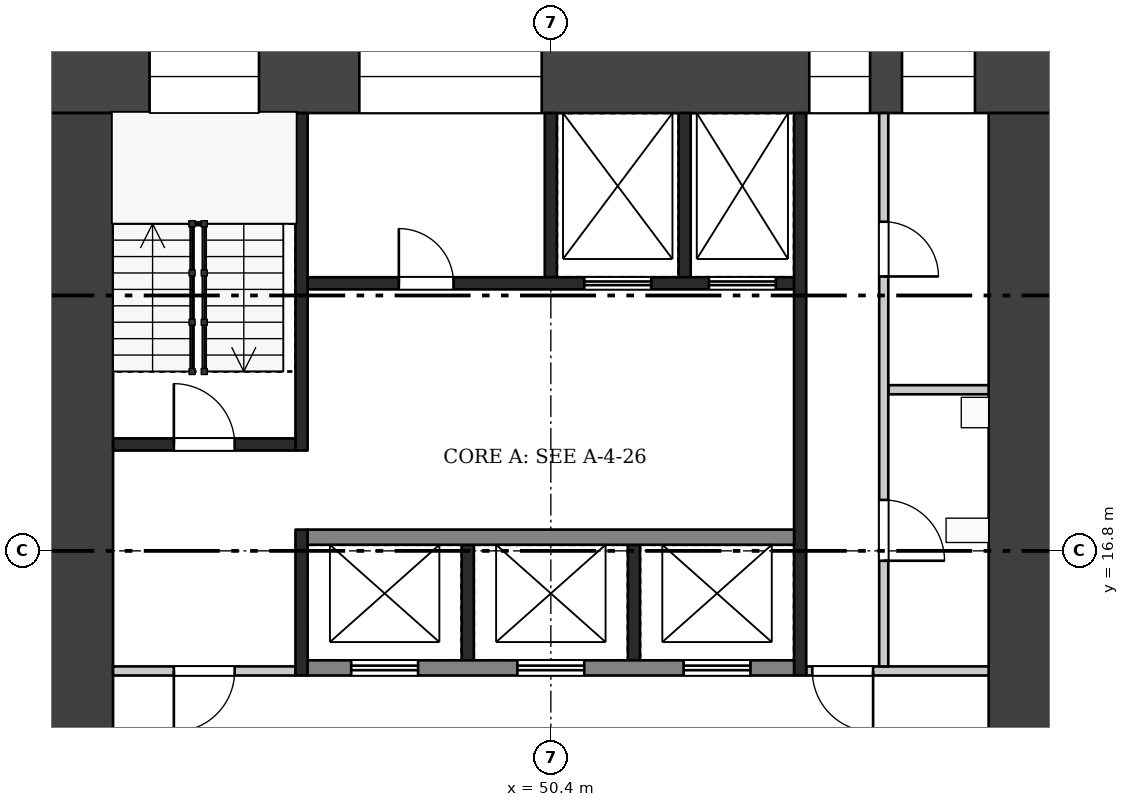
"""IFC4 building model, lengths in metres.
Left out: names, types, materials, properties, quantities, classifications, styles, units other than length and angle.
Written with IfcOpenShell. Run it as: python <this file> out.ifc"""

import sys

from ifc_helpers import new_model, si_unit, direction, frame, frame_2d, origin, place, context, subcontext, project, spatial, rectangle, extrude, element, fill, save


model = new_model("IFC4")
c1 = context("Model", 3, precision=1e-05, world=origin(), true_north=direction((0.0, 1.0)))
c2 = subcontext(c1, "Body", "Model", "MODEL_VIEW")
j1 = project(units=[si_unit("LENGTHUNIT", "METRE"), si_unit("PLANEANGLEUNIT", "RADIAN")], contexts=[c1])
p1 = place(None, origin())
s1 = spatial("IfcSite", under=j1, at=p1, CompositionType="ELEMENT")
p2 = place(p1, origin())
s2 = spatial("IfcBuilding", under=s1, at=p2, CompositionType="ELEMENT")
p3 = place(p2, frame((0.0, 0.0, 179.2)))
s3 = spatial("IfcBuildingStorey", under=s2, at=p3, CompositionType="ELEMENT", Elevation=179.2)
p4 = place(p3, frame((42.0, 24.6, 0.0), z_axis=(0.0, 0.0, 1.0), x_axis=(1.0, 0.0, 0.0)))
e1 = element("IfcWall", 1, at=p4, inside=s3, PredefinedType="SHEAR", context=c2, shape_type="SweptSolid", body=[
    extrude(rectangle(XDim=16.8, YDim=1.2, at=frame_2d((8.4, 0.0))), origin(), (0.0, 0.0, 1.0), 3.22),
])
p5 = place(p4, frame((1.8, 0.0, 0.5)))
e2 = element("IfcOpeningElement", 2, at=p5, cuts=e1, PredefinedType="OPENING", context=c2, shape_type="SweptSolid", body=[
    extrude(rectangle(XDim=1.8, YDim=2.4, at=frame_2d((0.9, 1.2))), frame((0.0, 0.61, 0.0), z_axis=(0.0, -1.0, 0.0), x_axis=(1.0, 0.0, 0.0)), (0.0, 0.0, 1.0), 1.22),
])
p6 = place(p4, frame((5.25, 0.0, 1.6)))
e3 = element("IfcOpeningElement", 3, at=p6, cuts=e1, PredefinedType="OPENING", context=c2, shape_type="SweptSolid", body=[
    extrude(rectangle(XDim=3.0, YDim=1.2, at=frame_2d((1.5, 0.6))), frame((0.0, 0.61, 0.0), z_axis=(0.0, -1.0, 0.0), x_axis=(1.0, 0.0, 0.0)), (0.0, 0.0, 1.0), 1.22),
])
p7 = place(p4, frame((12.65, 0.0, 0.6)))
e4 = element("IfcOpeningElement", 4, at=p7, cuts=e1, PredefinedType="OPENING", context=c2, shape_type="SweptSolid", body=[
    extrude(rectangle(XDim=1.0, YDim=2.1, at=frame_2d((0.5, 1.05))), frame((0.0, 0.61, 0.0), z_axis=(0.0, -1.0, 0.0), x_axis=(1.0, 0.0, 0.0)), (0.0, 0.0, 1.0), 1.22),
])
p8 = place(p4, frame((14.175, 0.0, 1.6)))
e5 = element("IfcOpeningElement", 5, at=p8, cuts=e1, PredefinedType="OPENING", context=c2, shape_type="SweptSolid", body=[
    extrude(rectangle(XDim=1.2, YDim=1.2, at=frame_2d((0.6, 0.6))), frame((0.0, 0.61, 0.0), z_axis=(0.0, -1.0, 0.0), x_axis=(1.0, 0.0, 0.0)), (0.0, 0.0, 1.0), 1.22),
])
p9 = place(p3, frame((42.6, 9.6, 0.0), z_axis=(0.0, 0.0, 1.0), x_axis=(0.0, 1.0, 0.0)))
e6 = element("IfcWall", 6, at=p9, inside=s3, PredefinedType="SHEAR", context=c2, shape_type="SweptSolid", body=[
    extrude(rectangle(XDim=14.4, YDim=1.2, at=frame_2d((7.2, 0.0))), origin(), (0.0, 0.0, 1.0), 3.22),
])
p10 = place(p9, frame((2.1, 0.0, 0.0)))
e7 = element("IfcOpeningElement", 7, at=p10, cuts=e6, PredefinedType="OPENING", context=c2, shape_type="SweptSolid", body=[
    extrude(rectangle(XDim=1.8, YDim=2.1, at=frame_2d((0.9, 1.05))), frame((0.0, 0.61, 0.0), z_axis=(0.0, -1.0, 0.0), x_axis=(1.0, 0.0, 0.0)), (0.0, 0.0, 1.0), 1.22),
])
p11 = place(p3, frame((58.2, 9.6, 0.0), z_axis=(0.0, 0.0, 1.0), x_axis=(0.0, 1.0, 0.0)))
e8 = element("IfcWall", 8, at=p11, inside=s3, PredefinedType="SHEAR", context=c2, shape_type="SweptSolid", body=[
    extrude(rectangle(XDim=14.4, YDim=1.2, at=frame_2d((7.2, 0.0))), origin(), (0.0, 0.0, 1.0), 3.22),
])
p12 = place(p11, frame((2.1, 0.0, 0.0)))
e9 = element("IfcOpeningElement", 9, at=p12, cuts=e8, PredefinedType="OPENING", context=c2, shape_type="SweptSolid", body=[
    extrude(rectangle(XDim=1.8, YDim=2.1, at=frame_2d((0.9, 1.05))), frame((0.0, 0.61, 0.0), z_axis=(0.0, -1.0, 0.0), x_axis=(1.0, 0.0, 0.0)), (0.0, 0.0, 1.0), 1.22),
])
for number, where, z_axis, x_axis in (
    (10, (49.033, 15.0, 0.0), (0.0, 0.0, 1.0), (0.0, 1.0, 0.0)),
    (11, (51.767, 15.0, 0.0), (0.0, 0.0, 1.0), (0.0, 1.0, 0.0)),
):
    element("IfcWall", number, at=place(p3, frame(where, z_axis=z_axis, x_axis=x_axis)), inside=s3, PredefinedType="SHEAR", context=c2, shape_type="SweptSolid", body=[
        extrude(rectangle(XDim=1.9, YDim=0.2, at=frame_2d((0.95, 0.0))), origin(), (0.0, 0.0, 1.0), 3.22),
    ])
p13 = place(p3, frame((46.4, 14.875, 0.0), z_axis=(0.0, 0.0, 1.0), x_axis=(1.0, 0.0, 0.0)))
e12 = element("IfcWall", 12, at=p13, inside=s3, PredefinedType="SHEAR", context=c2, shape_type="SweptSolid", body=[
    extrude(rectangle(XDim=8.0, YDim=0.25, at=frame_2d((4.0, 0.0))), origin(), (0.0, 0.0, 1.0), 3.22),
])
p14 = place(p13, frame((0.717, 0.0, 0.0)))
e13 = element("IfcOpeningElement", 13, at=p14, cuts=e12, PredefinedType="OPENING", context=c2, shape_type="SweptSolid", body=[
    extrude(rectangle(XDim=1.1, YDim=2.1, at=frame_2d((0.55, 1.05))), frame((0.0, 0.135, 0.0), z_axis=(0.0, -1.0, 0.0), x_axis=(1.0, 0.0, 0.0)), (0.0, 0.0, 1.0), 0.27),
])
p15 = place(p13, frame((3.45, 0.0, 0.0)))
e14 = element("IfcOpeningElement", 14, at=p15, cuts=e12, PredefinedType="OPENING", context=c2, shape_type="SweptSolid", body=[
    extrude(rectangle(XDim=1.1, YDim=2.1, at=frame_2d((0.55, 1.05))), frame((0.0, 0.135, 0.0), z_axis=(0.0, -1.0, 0.0), x_axis=(1.0, 0.0, 0.0)), (0.0, 0.0, 1.0), 0.27),
])
p16 = place(p13, frame((6.183, 0.0, 0.0)))
e15 = element("IfcOpeningElement", 15, at=p16, cuts=e12, PredefinedType="OPENING", context=c2, shape_type="SweptSolid", body=[
    extrude(rectangle(XDim=1.1, YDim=2.1, at=frame_2d((0.55, 1.05))), frame((0.0, 0.135, 0.0), z_axis=(0.0, -1.0, 0.0), x_axis=(1.0, 0.0, 0.0)), (0.0, 0.0, 1.0), 0.27),
])
p17 = place(p3, frame((46.4, 17.025, 0.0), z_axis=(0.0, 0.0, 1.0), x_axis=(1.0, 0.0, 0.0)))
e16 = element("IfcWall", 16, at=p17, inside=s3, PredefinedType="SHEAR", context=c2, shape_type="SweptSolid", body=[
    extrude(rectangle(XDim=8.0, YDim=0.25, at=frame_2d((4.0, 0.0))), origin(), (0.0, 0.0, 1.0), 3.22),
])
for number, where, z_axis, x_axis in (
    (17, (50.4, 21.3, 0.0), (0.0, 0.0, 1.0), (0.0, 1.0, 0.0)),
    (18, (52.6, 21.3, 0.0), (0.0, 0.0, 1.0), (0.0, 1.0, 0.0)),
):
    element("IfcWall", number, at=place(p3, frame(where, z_axis=z_axis, x_axis=x_axis)), inside=s3, PredefinedType="SHEAR", context=c2, shape_type="SweptSolid", body=[
        extrude(rectangle(XDim=2.7, YDim=0.2, at=frame_2d((1.35, 0.0))), origin(), (0.0, 0.0, 1.0), 3.22),
    ])
p18 = place(p3, frame((46.4, 21.2, 0.0), z_axis=(0.0, 0.0, 1.0), x_axis=(1.0, 0.0, 0.0)))
e19 = element("IfcWall", 19, at=p18, inside=s3, PredefinedType="SHEAR", context=c2, shape_type="SweptSolid", body=[
    extrude(rectangle(XDim=8.0, YDim=0.2, at=frame_2d((4.0, 0.0))), origin(), (0.0, 0.0, 1.0), 3.22),
])
p19 = place(p18, frame((1.5, 0.0, 0.0)))
e20 = element("IfcOpeningElement", 20, at=p19, cuts=e19, PredefinedType="OPENING", context=c2, shape_type="SweptSolid", body=[
    extrude(rectangle(XDim=0.9, YDim=2.1, at=frame_2d((0.45, 1.05))), frame((0.0, 0.11, 0.0), z_axis=(0.0, -1.0, 0.0), x_axis=(1.0, 0.0, 0.0)), (0.0, 0.0, 1.0), 0.22),
])
p20 = place(p18, frame((4.55, 0.0, 0.0)))
e21 = element("IfcOpeningElement", 21, at=p20, cuts=e19, PredefinedType="OPENING", context=c2, shape_type="SweptSolid", body=[
    extrude(rectangle(XDim=1.1, YDim=2.1, at=frame_2d((0.55, 1.05))), frame((0.0, 0.11, 0.0), z_axis=(0.0, -1.0, 0.0), x_axis=(1.0, 0.0, 0.0)), (0.0, 0.0, 1.0), 0.22),
])
p21 = place(p18, frame((6.6, 0.0, 0.0)))
e22 = element("IfcOpeningElement", 22, at=p21, cuts=e19, PredefinedType="OPENING", context=c2, shape_type="SweptSolid", body=[
    extrude(rectangle(XDim=1.1, YDim=2.1, at=frame_2d((0.55, 1.05))), frame((0.0, 0.11, 0.0), z_axis=(0.0, -1.0, 0.0), x_axis=(1.0, 0.0, 0.0)), (0.0, 0.0, 1.0), 0.22),
])
p22 = place(p3, frame((46.3, 14.75, 0.0), z_axis=(0.0, 0.0, 1.0), x_axis=(0.0, 1.0, 0.0)))
e23 = element("IfcWall", 23, at=p22, inside=s3, PredefinedType="SHEAR", context=c2, shape_type="SweptSolid", body=[
    extrude(rectangle(XDim=2.4, YDim=0.2, at=frame_2d((1.2, 0.0))), origin(), (0.0, 0.0, 1.0), 3.22),
])
p23 = place(p3, frame((46.3, 18.45, 0.0), z_axis=(0.0, 0.0, 1.0), x_axis=(0.0, 1.0, 0.0)))
e24 = element("IfcWall", 24, at=p23, inside=s3, PredefinedType="SHEAR", context=c2, shape_type="SweptSolid", body=[
    extrude(rectangle(XDim=5.55, YDim=0.2, at=frame_2d((2.775, 0.0))), origin(), (0.0, 0.0, 1.0), 3.22),
])
p24 = place(p3, frame((43.2, 14.825, 0.0), z_axis=(0.0, 0.0, 1.0), x_axis=(1.0, 0.0, 0.0)))
e25 = element("IfcWall", 25, at=p24, inside=s3, PredefinedType="PARTITIONING", context=c2, shape_type="SweptSolid", body=[
    extrude(rectangle(XDim=3.0, YDim=0.15, at=frame_2d((1.5, 0.0))), origin(), (0.0, 0.0, 1.0), 3.22),
])
p25 = place(p24, frame((1.0, 0.0, 0.0)))
e26 = element("IfcOpeningElement", 26, at=p25, cuts=e25, PredefinedType="OPENING", context=c2, shape_type="SweptSolid", body=[
    extrude(rectangle(XDim=1.0, YDim=2.1, at=frame_2d((0.5, 1.05))), frame((0.0, 0.085, 0.0), z_axis=(0.0, -1.0, 0.0), x_axis=(1.0, 0.0, 0.0)), (0.0, 0.0, 1.0), 0.17),
])
p26 = place(p3, frame((43.2, 18.55, 0.0), z_axis=(0.0, 0.0, 1.0), x_axis=(1.0, 0.0, 0.0)))
e27 = element("IfcWall", 27, at=p26, inside=s3, PredefinedType="SHEAR", context=c2, shape_type="SweptSolid", body=[
    extrude(rectangle(XDim=3.0, YDim=0.2, at=frame_2d((1.5, 0.0))), origin(), (0.0, 0.0, 1.0), 3.22),
])
p27 = place(p26, frame((1.0, 0.0, 0.0)))
e28 = element("IfcOpeningElement", 28, at=p27, cuts=e27, PredefinedType="OPENING", context=c2, shape_type="SweptSolid", body=[
    extrude(rectangle(XDim=1.0, YDim=2.1, at=frame_2d((0.5, 1.05))), frame((0.0, 0.11, 0.0), z_axis=(0.0, -1.0, 0.0), x_axis=(1.0, 0.0, 0.0)), (0.0, 0.0, 1.0), 0.22),
])
p28 = place(p3, frame((54.5, 14.75, 0.0), z_axis=(0.0, 0.0, 1.0), x_axis=(0.0, 1.0, 0.0)))
e29 = element("IfcWall", 29, at=p28, inside=s3, PredefinedType="SHEAR", context=c2, shape_type="SweptSolid", body=[
    extrude(rectangle(XDim=9.25, YDim=0.2, at=frame_2d((4.625, 0.0))), origin(), (0.0, 0.0, 1.0), 3.22),
])
p29 = place(p3, frame((54.6, 14.825, 0.0), z_axis=(0.0, 0.0, 1.0), x_axis=(1.0, 0.0, 0.0)))
e30 = element("IfcWall", 30, at=p29, inside=s3, PredefinedType="PARTITIONING", context=c2, shape_type="SweptSolid", body=[
    extrude(rectangle(XDim=3.0, YDim=0.15, at=frame_2d((1.5, 0.0))), origin(), (0.0, 0.0, 1.0), 3.22),
])
p30 = place(p29, frame((0.1, 0.0, 0.0)))
e31 = element("IfcOpeningElement", 31, at=p30, cuts=e30, PredefinedType="OPENING", context=c2, shape_type="SweptSolid", body=[
    extrude(rectangle(XDim=1.0, YDim=2.1, at=frame_2d((0.5, 1.05))), frame((0.0, 0.085, 0.0), z_axis=(0.0, -1.0, 0.0), x_axis=(1.0, 0.0, 0.0)), (0.0, 0.0, 1.0), 0.17),
])
p31 = place(p3, frame((55.95, 19.45, 0.0), z_axis=(0.0, 0.0, 1.0), x_axis=(1.0, 0.0, 0.0)))
e32 = element("IfcWall", 32, at=p31, inside=s3, PredefinedType="PARTITIONING", context=c2, shape_type="SweptSolid", body=[
    extrude(rectangle(XDim=1.65, YDim=0.15, at=frame_2d((0.825, 0.0))), origin(), (0.0, 0.0, 1.0), 3.22),
])
p32 = place(p3, frame((55.875, 14.9, 0.0), z_axis=(0.0, 0.0, 1.0), x_axis=(0.0, 1.0, 0.0)))
e33 = element("IfcWall", 33, at=p32, inside=s3, PredefinedType="PARTITIONING", context=c2, shape_type="SweptSolid", body=[
    extrude(rectangle(XDim=9.1, YDim=0.15, at=frame_2d((4.55, 0.0))), origin(), (0.0, 0.0, 1.0), 3.22),
])
p33 = place(p32, frame((1.738, 0.0, 0.0)))
e34 = element("IfcOpeningElement", 34, at=p33, cuts=e33, PredefinedType="OPENING", context=c2, shape_type="SweptSolid", body=[
    extrude(rectangle(XDim=1.0, YDim=2.1, at=frame_2d((0.5, 1.05))), frame((0.0, 0.085, 0.0), z_axis=(0.0, -1.0, 0.0), x_axis=(1.0, 0.0, 0.0)), (0.0, 0.0, 1.0), 0.17),
])
p34 = place(p32, frame((6.413, 0.0, 0.0)))
e35 = element("IfcOpeningElement", 35, at=p34, cuts=e33, PredefinedType="OPENING", context=c2, shape_type="SweptSolid", body=[
    extrude(rectangle(XDim=0.9, YDim=2.1, at=frame_2d((0.45, 1.05))), frame((0.0, 0.085, 0.0), z_axis=(0.0, -1.0, 0.0), x_axis=(1.0, 0.0, 0.0)), (0.0, 0.0, 1.0), 0.17),
])
p35 = place(p14, origin())
e36 = element("IfcDoor", 36, at=p35, inside=s3, OperationType="DOUBLE_DOOR_SLIDING", PredefinedType="DOOR", context=c2, shape_type="SweptSolid", body=[
    extrude(rectangle(XDim=1.1, YDim=2.1, at=frame_2d((0.55, 1.05))), frame((0.0, 0.025, 0.0), z_axis=(0.0, -1.0, 0.0), x_axis=(1.0, 0.0, 0.0)), (0.0, 0.0, 1.0), 0.05),
])
fill(e13, e36)
p36 = place(p15, origin())
e37 = element("IfcDoor", 37, at=p36, inside=s3, OperationType="DOUBLE_DOOR_SLIDING", PredefinedType="DOOR", context=c2, shape_type="SweptSolid", body=[
    extrude(rectangle(XDim=1.1, YDim=2.1, at=frame_2d((0.55, 1.05))), frame((0.0, 0.025, 0.0), z_axis=(0.0, -1.0, 0.0), x_axis=(1.0, 0.0, 0.0)), (0.0, 0.0, 1.0), 0.05),
])
fill(e14, e37)
p37 = place(p16, origin())
e38 = element("IfcDoor", 38, at=p37, inside=s3, OperationType="DOUBLE_DOOR_SLIDING", PredefinedType="DOOR", context=c2, shape_type="SweptSolid", body=[
    extrude(rectangle(XDim=1.1, YDim=2.1, at=frame_2d((0.55, 1.05))), frame((0.0, 0.025, 0.0), z_axis=(0.0, -1.0, 0.0), x_axis=(1.0, 0.0, 0.0)), (0.0, 0.0, 1.0), 0.05),
])
fill(e15, e38)
p38 = place(p19, origin())
e39 = element("IfcDoor", 39, at=p38, inside=s3, OperationType="SINGLE_SWING_LEFT", PredefinedType="DOOR", context=c2, shape_type="SweptSolid", body=[
    extrude(rectangle(XDim=0.9, YDim=2.1, at=frame_2d((0.45, 1.05))), frame((0.0, 0.025, 0.0), z_axis=(0.0, -1.0, 0.0), x_axis=(1.0, 0.0, 0.0)), (0.0, 0.0, 1.0), 0.05),
])
fill(e20, e39)
p39 = place(p20, origin())
e40 = element("IfcDoor", 40, at=p39, inside=s3, OperationType="DOUBLE_DOOR_SLIDING", PredefinedType="DOOR", context=c2, shape_type="SweptSolid", body=[
    extrude(rectangle(XDim=1.1, YDim=2.1, at=frame_2d((0.55, 1.05))), frame((0.0, 0.025, 0.0), z_axis=(0.0, -1.0, 0.0), x_axis=(1.0, 0.0, 0.0)), (0.0, 0.0, 1.0), 0.05),
])
fill(e21, e40)
p40 = place(p21, origin())
e41 = element("IfcDoor", 41, at=p40, inside=s3, OperationType="DOUBLE_DOOR_SLIDING", PredefinedType="DOOR", context=c2, shape_type="SweptSolid", body=[
    extrude(rectangle(XDim=1.1, YDim=2.1, at=frame_2d((0.55, 1.05))), frame((0.0, 0.025, 0.0), z_axis=(0.0, -1.0, 0.0), x_axis=(1.0, 0.0, 0.0)), (0.0, 0.0, 1.0), 0.05),
])
fill(e22, e41)
p41 = place(p25, frame((1.0, 0.0, 0.0), z_axis=(0.0, 0.0, 1.0), x_axis=(-1.0, 0.0, 0.0)))
e42 = element("IfcDoor", 42, at=p41, inside=s3, OperationType="SINGLE_SWING_RIGHT", PredefinedType="DOOR", context=c2, shape_type="SweptSolid", body=[
    extrude(rectangle(XDim=1.0, YDim=2.1, at=frame_2d((0.5, 1.05))), frame((0.0, 0.025, 0.0), z_axis=(0.0, -1.0, 0.0), x_axis=(1.0, 0.0, 0.0)), (0.0, 0.0, 1.0), 0.05),
])
fill(e26, e42)
p42 = place(p27, origin())
e43 = element("IfcDoor", 43, at=p42, inside=s3, OperationType="SINGLE_SWING_LEFT", PredefinedType="DOOR", context=c2, shape_type="SweptSolid", body=[
    extrude(rectangle(XDim=1.0, YDim=2.1, at=frame_2d((0.5, 1.05))), frame((0.0, 0.025, 0.0), z_axis=(0.0, -1.0, 0.0), x_axis=(1.0, 0.0, 0.0)), (0.0, 0.0, 1.0), 0.05),
])
fill(e28, e43)
p43 = place(p30, frame((1.0, 0.0, 0.0), z_axis=(0.0, 0.0, 1.0), x_axis=(-1.0, 0.0, 0.0)))
e44 = element("IfcDoor", 44, at=p43, inside=s3, OperationType="SINGLE_SWING_LEFT", PredefinedType="DOOR", context=c2, shape_type="SweptSolid", body=[
    extrude(rectangle(XDim=1.0, YDim=2.1, at=frame_2d((0.5, 1.05))), frame((0.0, 0.025, 0.0), z_axis=(0.0, -1.0, 0.0), x_axis=(1.0, 0.0, 0.0)), (0.0, 0.0, 1.0), 0.05),
])
fill(e31, e44)
p44 = place(p33, frame((1.0, 0.0, 0.0), z_axis=(0.0, 0.0, 1.0), x_axis=(-1.0, 0.0, 0.0)))
e45 = element("IfcDoor", 45, at=p44, inside=s3, OperationType="SINGLE_SWING_RIGHT", PredefinedType="DOOR", context=c2, shape_type="SweptSolid", body=[
    extrude(rectangle(XDim=1.0, YDim=2.1, at=frame_2d((0.5, 1.05))), frame((0.0, 0.025, 0.0), z_axis=(0.0, -1.0, 0.0), x_axis=(1.0, 0.0, 0.0)), (0.0, 0.0, 1.0), 0.05),
])
fill(e34, e45)
p45 = place(p34, frame((0.9, 0.0, 0.0), z_axis=(0.0, 0.0, 1.0), x_axis=(-1.0, 0.0, 0.0)))
e46 = element("IfcDoor", 46, at=p45, inside=s3, OperationType="SINGLE_SWING_RIGHT", PredefinedType="DOOR", context=c2, shape_type="SweptSolid", body=[
    extrude(rectangle(XDim=0.9, YDim=2.1, at=frame_2d((0.45, 1.05))), frame((0.0, 0.025, 0.0), z_axis=(0.0, -1.0, 0.0), x_axis=(1.0, 0.0, 0.0)), (0.0, 0.0, 1.0), 0.05),
])
fill(e35, e46)
p46 = place(p5, origin())
e47 = element("IfcWindow", 47, at=p46, inside=s3, PartitioningType="SINGLE_PANEL", PredefinedType="WINDOW", context=c2, shape_type="SweptSolid", body=[
    extrude(rectangle(XDim=1.8, YDim=2.4, at=frame_2d((0.9, 1.2))), frame((0.0, 0.03, 0.0), z_axis=(0.0, -1.0, 0.0), x_axis=(1.0, 0.0, 0.0)), (0.0, 0.0, 1.0), 0.06),
])
fill(e2, e47)
p47 = place(p6, origin())
e48 = element("IfcWindow", 48, at=p47, inside=s3, PartitioningType="SINGLE_PANEL", PredefinedType="WINDOW", context=c2, shape_type="SweptSolid", body=[
    extrude(rectangle(XDim=3.0, YDim=1.2, at=frame_2d((1.5, 0.6))), frame((0.0, 0.03, 0.0), z_axis=(0.0, -1.0, 0.0), x_axis=(1.0, 0.0, 0.0)), (0.0, 0.0, 1.0), 0.06),
])
fill(e3, e48)
p48 = place(p7, origin())
e49 = element("IfcWindow", 49, at=p48, inside=s3, PartitioningType="SINGLE_PANEL", PredefinedType="WINDOW", context=c2, shape_type="SweptSolid", body=[
    extrude(rectangle(XDim=1.0, YDim=2.1, at=frame_2d((0.5, 1.05))), frame((0.0, 0.03, 0.0), z_axis=(0.0, -1.0, 0.0), x_axis=(1.0, 0.0, 0.0)), (0.0, 0.0, 1.0), 0.06),
])
fill(e4, e49)
p49 = place(p8, origin())
e50 = element("IfcWindow", 50, at=p49, inside=s3, PartitioningType="SINGLE_PANEL", PredefinedType="WINDOW", context=c2, shape_type="SweptSolid", body=[
    extrude(rectangle(XDim=1.2, YDim=1.2, at=frame_2d((0.6, 0.6))), frame((0.0, 0.03, 0.0), z_axis=(0.0, -1.0, 0.0), x_axis=(1.0, 0.0, 0.0)), (0.0, 0.0, 1.0), 0.06),
])
fill(e5, e50)
save(model, sys.argv[1])
